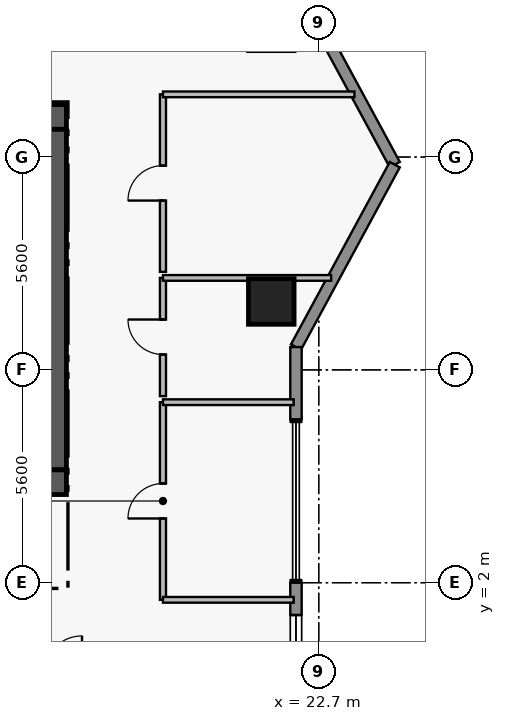
"""IFC4 building model, lengths in metres.
Left out: names, types, materials, properties, quantities, classifications, styles, units other than length and angle.
Written with IfcOpenShell. Run it as: python <this file> out.ifc"""

import sys

from ifc_helpers import new_model, si_unit, direction, frame, frame_2d, origin, origin_2d, place, context, subcontext, project, spatial, rectangle, extrude, element, fill, save


model = new_model("IFC4")
c1 = context("Model", 3, precision=1e-05, world=origin(), true_north=direction((0.0, 1.0)))
c2 = subcontext(c1, "Body", "Model", "MODEL_VIEW")
j1 = project(units=[si_unit("LENGTHUNIT", "METRE"), si_unit("PLANEANGLEUNIT", "RADIAN")], contexts=[c1])
p1 = place(None, origin())
s1 = spatial("IfcSite", under=j1, at=p1, CompositionType="ELEMENT")
p2 = place(p1, origin())
s2 = spatial("IfcBuilding", under=s1, at=p2, CompositionType="ELEMENT")
p3 = place(p2, frame((0.0, 0.0, 203.65)))
s3 = spatial("IfcBuildingStorey", under=s2, at=p3, CompositionType="ELEMENT", Elevation=203.65)
p4 = place(p3, frame((11.6, 14.255, 0.0), z_axis=(0.0, 0.0, 1.0), x_axis=(1.0, 0.0, 0.0)))
e1 = element("IfcWall", 1, at=p4, inside=s3, PredefinedType="SHEAR", context=c2, shape_type="SweptSolid", body=[
    extrude(rectangle(XDim=4.46, YDim=0.65, at=frame_2d((2.23, 0.0))), origin(), (0.0, 0.0, 1.0), 3.56),
])
p5 = place(p3, frame((15.735, 4.97, 0.0), z_axis=(0.0, 0.0, 1.0), x_axis=(0.0, 1.0, 0.0)))
e2 = element("IfcWall", 2, at=p5, inside=s3, PredefinedType="SHEAR", context=c2, shape_type="SweptSolid", body=[
    extrude(rectangle(XDim=8.96, YDim=0.65, at=frame_2d((4.48, 0.0))), origin(), (0.0, 0.0, 1.0), 3.56),
])
p6 = place(p3, frame((11.6, 4.645, 0.0), z_axis=(0.0, 0.0, 1.0), x_axis=(1.0, 0.0, 0.0)))
e3 = element("IfcWall", 3, at=p6, inside=s3, PredefinedType="SHEAR", context=c2, shape_type="SweptSolid", body=[
    extrude(rectangle(XDim=4.46, YDim=0.65, at=frame_2d((2.23, 0.0))), origin(), (0.0, 0.0, 1.0), 3.56),
])
p7 = place(p3, frame((21.45, 9.4, 0.0), z_axis=(0.0, 0.0, 1.0), x_axis=(1.0, 0.0, 0.0)))
e4 = element("IfcColumn", 4, at=p7, inside=s3, PredefinedType="COLUMN", context=c2, shape_type="SweptSolid", body=[
    extrude(rectangle(XDim=1.2, YDim=1.2, at=origin_2d()), origin(), (0.0, 0.0, 1.0), 3.75),
])
for number, where, z_axis, x_axis in (
    (5, (22.1, 17.8, 0.0), (0.0, 0.0, 1.0), (0.476, -0.879, 0.0)),
    (6, (24.7, 13.0, 0.0), (0.0, 0.0, 1.0), (-0.476, -0.879, 0.0)),
):
    element("IfcWall", number, at=place(p3, frame(where, z_axis=z_axis, x_axis=x_axis)), inside=s3, PredefinedType="STANDARD", context=c2, shape_type="SweptSolid", body=[
        extrude(rectangle(XDim=5.459, YDim=0.3, at=frame_2d((2.729, 0.0))), origin(), (0.0, 0.0, 1.0), 3.53),
    ])
p8 = place(p3, frame((22.1, 8.2, 0.0), z_axis=(0.0, 0.0, 1.0), x_axis=(0.0, -1.0, 0.0)))
e7 = element("IfcWall", 7, at=p8, inside=s3, PredefinedType="STANDARD", context=c2, shape_type="SweptSolid", body=[
    extrude(rectangle(XDim=1.9, YDim=0.3, at=frame_2d((0.95, 0.0))), origin(), (0.0, 0.0, 1.0), 3.53),
])
p9 = place(p3, frame((22.1, 2.0, 0.0), z_axis=(0.0, 0.0, 1.0), x_axis=(0.0, -1.0, 0.0)))
e8 = element("IfcWall", 8, at=p9, inside=s3, PredefinedType="STANDARD", context=c2, shape_type="SweptSolid", body=[
    extrude(rectangle(XDim=2.85, YDim=0.3, at=frame_2d((1.425, 0.0))), origin(), (0.0, 0.0, 1.0), 3.53),
])
p10 = place(p9, frame((0.85, 0.0, 0.95)))
e9 = element("IfcOpeningElement", 9, at=p10, cuts=e8, PredefinedType="OPENING", context=c2, shape_type="SweptSolid", body=[
    extrude(rectangle(XDim=1.15, YDim=1.55, at=frame_2d((0.575, 0.775))), frame((0.0, 0.16, 0.0), z_axis=(0.0, -1.0, 0.0), x_axis=(1.0, 0.0, 0.0)), (0.0, 0.0, 1.0), 0.32),
])
p11 = place(p3, frame((18.6, 1.55, 0.0), z_axis=(0.0, 0.0, 1.0), x_axis=(0.0, 1.0, 0.0)))
e10 = element("IfcWall", 10, at=p11, inside=s3, PredefinedType="PARTITIONING", context=c2, shape_type="SweptSolid", body=[
    extrude(rectangle(XDim=5.2, YDim=0.16, at=frame_2d((2.6, 0.0))), origin(), (0.0, 0.0, 1.0), 3.53),
])
p12 = place(p11, frame((2.14, 0.0, 0.0)))
e11 = element("IfcOpeningElement", 11, at=p12, cuts=e10, PredefinedType="OPENING", context=c2, shape_type="SweptSolid", body=[
    extrude(rectangle(XDim=0.92, YDim=2.12, at=frame_2d((0.46, 1.06))), frame((0.0, 0.09, 0.0), z_axis=(0.0, -1.0, 0.0), x_axis=(1.0, 0.0, 0.0)), (0.0, 0.0, 1.0), 0.18),
])
p13 = place(p3, frame((18.6, 6.91, 0.0), z_axis=(0.0, 0.0, 1.0), x_axis=(0.0, 1.0, 0.0)))
e12 = element("IfcWall", 12, at=p13, inside=s3, PredefinedType="PARTITIONING", context=c2, shape_type="SweptSolid", body=[
    extrude(rectangle(XDim=3.11, YDim=0.16, at=frame_2d((1.555, 0.0))), origin(), (0.0, 0.0, 1.0), 3.53),
])
p14 = place(p13, frame((1.095, 0.0, 0.0)))
e13 = element("IfcOpeningElement", 13, at=p14, cuts=e12, PredefinedType="OPENING", context=c2, shape_type="SweptSolid", body=[
    extrude(rectangle(XDim=0.92, YDim=2.12, at=frame_2d((0.46, 1.06))), frame((0.0, 0.09, 0.0), z_axis=(0.0, -1.0, 0.0), x_axis=(1.0, 0.0, 0.0)), (0.0, 0.0, 1.0), 0.18),
])
p15 = place(p3, frame((18.6, 10.18, 0.0), z_axis=(0.0, 0.0, 1.0), x_axis=(0.0, 1.0, 0.0)))
e14 = element("IfcWall", 14, at=p15, inside=s3, PredefinedType="PARTITIONING", context=c2, shape_type="SweptSolid", body=[
    extrude(rectangle(XDim=4.67, YDim=0.16, at=frame_2d((2.335, 0.0))), origin(), (0.0, 0.0, 1.0), 3.53),
])
p16 = place(p15, frame((1.875, 0.0, 0.0)))
e15 = element("IfcOpeningElement", 15, at=p16, cuts=e14, PredefinedType="OPENING", context=c2, shape_type="SweptSolid", body=[
    extrude(rectangle(XDim=0.92, YDim=2.12, at=frame_2d((0.46, 1.06))), frame((0.0, 0.09, 0.0), z_axis=(0.0, -1.0, 0.0), x_axis=(1.0, 0.0, 0.0)), (0.0, 0.0, 1.0), 0.18),
])
for number, where, z_axis, x_axis in (
    (16, (18.6, 1.55, 0.0), (0.0, 0.0, 1.0), (1.0, 0.0, 0.0)),
    (17, (18.6, 6.75, 0.0), (0.0, 0.0, 1.0), (1.0, 0.0, 0.0)),
):
    element("IfcWall", number, at=place(p3, frame(where, z_axis=z_axis, x_axis=x_axis)), inside=s3, PredefinedType="PARTITIONING", context=c2, shape_type="SweptSolid", body=[
        extrude(rectangle(XDim=3.44, YDim=0.15, at=frame_2d((1.72, 0.0))), origin(), (0.0, 0.0, 1.0), 3.53),
    ])
p17 = place(p3, frame((18.6, 10.02, 0.0), z_axis=(0.0, 0.0, 1.0), x_axis=(1.0, 0.0, 0.0)))
e18 = element("IfcWall", 18, at=p17, inside=s3, PredefinedType="PARTITIONING", context=c2, shape_type="SweptSolid", body=[
    extrude(rectangle(XDim=4.426, YDim=0.15, at=frame_2d((2.213, 0.0))), origin(), (0.0, 0.0, 1.0), 3.53),
])
p18 = place(p3, frame((18.6, 14.85, 0.0), z_axis=(0.0, 0.0, 1.0), x_axis=(1.0, 0.0, 0.0)))
e19 = element("IfcWall", 19, at=p18, inside=s3, PredefinedType="PARTITIONING", context=c2, shape_type="SweptSolid", body=[
    extrude(rectangle(XDim=5.038, YDim=0.15, at=frame_2d((2.519, 0.0))), origin(), (0.0, 0.0, 1.0), 3.53),
])
p19 = place(p10, origin())
e20 = element("IfcWindow", 20, at=p19, inside=s3, PartitioningType="SINGLE_PANEL", PredefinedType="WINDOW", context=c2, shape_type="SweptSolid", body=[
    extrude(rectangle(XDim=1.15, YDim=1.55, at=frame_2d((0.575, 0.775))), frame((0.0, 0.03, 0.0), z_axis=(0.0, -1.0, 0.0), x_axis=(1.0, 0.0, 0.0)), (0.0, 0.0, 1.0), 0.06),
])
fill(e9, e20)
p20 = place(p12, origin())
e21 = element("IfcDoor", 21, at=p20, inside=s3, OperationType="SINGLE_SWING_LEFT", PredefinedType="DOOR", context=c2, shape_type="SweptSolid", body=[
    extrude(rectangle(XDim=0.92, YDim=2.12, at=frame_2d((0.46, 1.06))), frame((0.0, 0.025, 0.0), z_axis=(0.0, -1.0, 0.0), x_axis=(1.0, 0.0, 0.0)), (0.0, 0.0, 1.0), 0.05),
])
fill(e11, e21)
p21 = place(p14, origin())
e22 = element("IfcDoor", 22, at=p21, inside=s3, OperationType="SINGLE_SWING_RIGHT", PredefinedType="DOOR", context=c2, shape_type="SweptSolid", body=[
    extrude(rectangle(XDim=0.92, YDim=2.12, at=frame_2d((0.46, 1.06))), frame((0.0, 0.025, 0.0), z_axis=(0.0, -1.0, 0.0), x_axis=(1.0, 0.0, 0.0)), (0.0, 0.0, 1.0), 0.05),
])
fill(e13, e22)
p22 = place(p16, origin())
e23 = element("IfcDoor", 23, at=p22, inside=s3, OperationType="SINGLE_SWING_LEFT", PredefinedType="DOOR", context=c2, shape_type="SweptSolid", body=[
    extrude(rectangle(XDim=0.92, YDim=2.12, at=frame_2d((0.46, 1.06))), frame((0.0, 0.025, 0.0), z_axis=(0.0, -1.0, 0.0), x_axis=(1.0, 0.0, 0.0)), (0.0, 0.0, 1.0), 0.05),
])
fill(e15, e23)
save(model, sys.argv[1])
